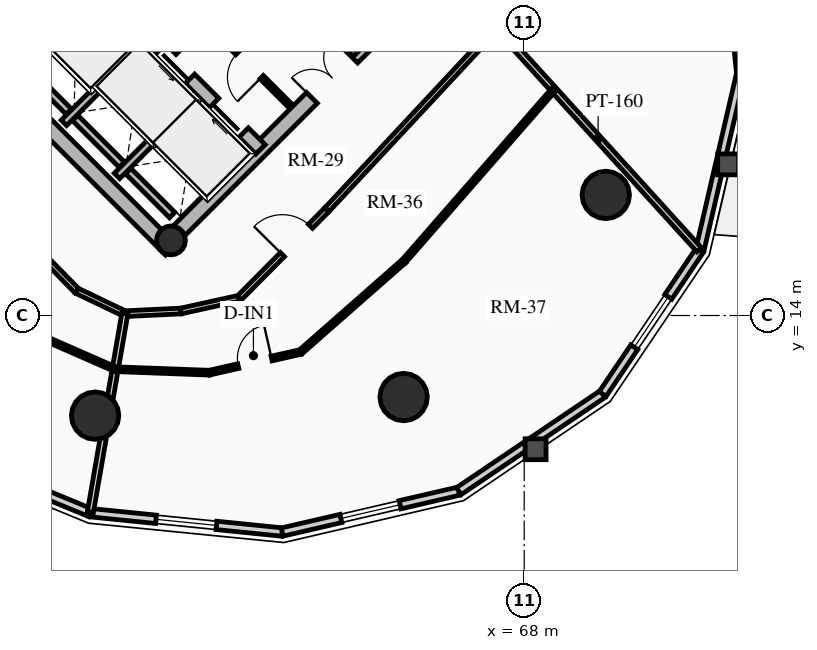
"""IFC4 building model, lengths in metres.
Left out: names, types, materials, properties, quantities, classifications, styles, units other than length and angle.
Written with IfcOpenShell. Run it as: python <this file> out.ifc"""

import sys

from ifc_helpers import new_model, si_unit, direction, frame, frame_2d, origin, origin_2d, place, context, subcontext, project, spatial, rectangle, circle, hollow_circle, extrude, source, transform, mapped, element, fill, save


model = new_model("IFC4")
c1 = context("Model", 3, precision=1e-05, world=origin(), true_north=direction((0.0, 1.0)))
c2 = subcontext(c1, "Body", "Model", "MODEL_VIEW")
j1 = project(units=[si_unit("LENGTHUNIT", "METRE"), si_unit("PLANEANGLEUNIT", "RADIAN")], contexts=[c1])
p1 = place(None, origin())
s1 = spatial("IfcSite", under=j1, at=p1, CompositionType="ELEMENT")
p2 = place(p1, origin())
s2 = spatial("IfcBuilding", under=s1, at=p2, CompositionType="ELEMENT")
p3 = place(p2, frame((0.0, 0.0, 163.24)))
s3 = spatial("IfcBuildingStorey", under=s2, at=p3, CompositionType="ELEMENT", Elevation=163.24)
p4 = place(p3, frame((58.702, 15.732, 0.0), z_axis=(0.0, 0.0, 1.0), x_axis=(-0.707106781187, 0.707106781187, 0.0)))
e1 = element("IfcWall", 1, at=p4, inside=s3, PredefinedType="SHEAR", context=c2, shape_type="SweptSolid", body=[
    extrude(rectangle(XDim=14.1, YDim=0.4, at=frame_2d((7.05, 0.0))), origin(), (0.0, 0.0, 1.0), 2.91),
])
p5 = place(p3, frame((58.561, 15.873, 0.0), z_axis=(0.0, 0.0, 1.0), x_axis=(0.707106781187, 0.707106781187, 0.0)))
e2 = element("IfcWall", 2, at=p5, inside=s3, PredefinedType="SHEAR", context=c2, shape_type="SweptSolid", body=[
    extrude(rectangle(XDim=10.7, YDim=0.4, at=frame_2d((5.35, 0.0))), origin(), (0.0, 0.0, 1.0), 2.91),
])
m1 = source(origin(), c2, "Body", "SweptSolid", [
    extrude(rectangle(XDim=1.5, YDim=2.02, at=frame_2d((0.75, 1.01))), frame((0.0, 0.21, 0.0), z_axis=(0.0, -1.0, 0.0), x_axis=(1.0, 0.0, 0.0)), (0.0, 0.0, 1.0), 0.42),
])
p6 = place(p5, frame((5.45, 0.0, 0.0)))
e3 = element("IfcOpeningElement", 3, at=p6, cuts=e2, PredefinedType="OPENING", context=c2, shape_type="MappedRepresentation", body=[
    mapped(m1, transform((0.0, 0.0, 0.0), x_axis=(1.0, 0.0, 0.0), y_axis=(0.0, 1.0, 0.0), z_axis=(0.0, 0.0, 1.0), scale=1.0)),
])
p7 = place(p3, frame((61.06, 18.373, 0.0), z_axis=(0.0, 0.0, 1.0), x_axis=(-0.707106781187, 0.707106781187, 0.0)))
e4 = element("IfcWall", 4, at=p7, inside=s3, PredefinedType="SHEAR", context=c2, shape_type="SweptSolid", body=[
    extrude(rectangle(XDim=13.7, YDim=0.35, at=frame_2d((6.85, 0.0))), origin(), (0.0, 0.0, 1.0), 2.91),
])
m2 = source(origin(), c2, "Body", "SweptSolid", [
    extrude(rectangle(XDim=1.1, YDim=2.015, at=frame_2d((0.55, 1.007))), frame((0.0, 0.185, 0.0), z_axis=(0.0, -1.0, 0.0), x_axis=(1.0, 0.0, 0.0)), (0.0, 0.0, 1.0), 0.37),
])
p8 = place(p7, frame((4.85, 0.0, 0.0)))
e5 = element("IfcOpeningElement", 5, at=p8, cuts=e4, PredefinedType="OPENING", context=c2, shape_type="MappedRepresentation", body=[
    mapped(m2, transform((0.0, 0.0, 0.0), x_axis=(1.0, 0.0, 0.0), y_axis=(0.0, 1.0, 0.0), z_axis=(0.0, 0.0, 1.0), scale=1.0)),
])
p9 = place(p7, frame((0.625, 0.0, 0.0)))
e6 = element("IfcOpeningElement", 6, at=p9, cuts=e4, PredefinedType="OPENING", context=c2, shape_type="MappedRepresentation", body=[
    mapped(m2, transform((0.0, 0.0, 0.0), x_axis=(1.0, 0.0, 0.0), y_axis=(0.0, 1.0, 0.0), z_axis=(0.0, 0.0, 1.0), scale=1.0)),
])
p10 = place(p7, frame((2.625, 0.0, 0.0)))
e7 = element("IfcOpeningElement", 7, at=p10, cuts=e4, PredefinedType="OPENING", context=c2, shape_type="MappedRepresentation", body=[
    mapped(m2, transform((0.0, 0.0, 0.0), x_axis=(1.0, 0.0, 0.0), y_axis=(0.0, 1.0, 0.0), z_axis=(0.0, 0.0, 1.0), scale=1.0)),
])
m3 = source(origin(), c2, "Body", "SweptSolid", [
    extrude(rectangle(XDim=1.15, YDim=2.02, at=frame_2d((0.575, 1.01))), frame((0.0, 0.185, 0.0), z_axis=(0.0, -1.0, 0.0), x_axis=(1.0, 0.0, 0.0)), (0.0, 0.0, 1.0), 0.37),
])
p11 = place(p7, frame((7.27, 0.0, 0.0)))
e8 = element("IfcOpeningElement", 8, at=p11, cuts=e4, PredefinedType="OPENING", context=c2, shape_type="MappedRepresentation", body=[
    mapped(m3, transform((0.0, 0.0, 0.0), x_axis=(1.0, 0.0, 0.0), y_axis=(0.0, 1.0, 0.0), z_axis=(0.0, 0.0, 1.0), scale=1.0)),
])
p12 = place(p3, frame((63.627, 20.94, 0.0), z_axis=(0.0, 0.0, 1.0), x_axis=(-0.707119496762, 0.707094065383, 0.0)))
e9 = element("IfcWall", 9, at=p12, inside=s3, PredefinedType="SHEAR", context=c2, shape_type="SweptSolid", body=[
    extrude(rectangle(XDim=9.6, YDim=0.35, at=frame_2d((4.8, 0.0))), origin(), (0.0, 0.0, 1.0), 2.91),
])
p13 = place(p12, frame((5.28, 0.0, 0.0)))
e10 = element("IfcOpeningElement", 10, at=p13, cuts=e9, PredefinedType="OPENING", context=c2, shape_type="MappedRepresentation", body=[
    mapped(m3, transform((0.0, 0.0, 0.0), x_axis=(1.0, 0.0, 0.0), y_axis=(0.0, 1.0, 0.0), z_axis=(0.0, 0.0, 1.0), scale=1.0)),
])
p14 = place(p3, frame((53.784, 21.003, 0.0), z_axis=(0.0, 0.0, 1.0), x_axis=(0.707106781187, 0.707106781187, 0.0)))
e11 = element("IfcWall", 11, at=p14, inside=s3, PredefinedType="SHEAR", context=c2, shape_type="SweptSolid", body=[
    extrude(rectangle(XDim=3.285, YDim=0.35, at=frame_2d((1.643, 0.0))), origin(), (0.0, 0.0, 1.0), 2.91),
])
p15 = place(p3, frame((58.706, 15.976, 0.0), z_axis=(0.0, 0.0, 1.0), x_axis=(0.707106781187, 0.707106781187, 0.0)))
e12 = element("IfcColumn", 12, at=p15, inside=s3, PredefinedType="COLUMN", context=c2, shape_type="SweptSolid", body=[
    extrude(hollow_circle(Radius=0.38, WallThickness=0.032, at=origin_2d()), origin(), (0.0, 0.0, 1.0), 2.91),
])
for number, where, z_axis, x_axis in (
    (13, (56.709, 11.365, 0.0), (0.0, 0.0, 1.0), (1.0, 0.0, 0.0)),
    (14, (64.827, 11.854, 0.0), (0.0, 0.0, 1.0), (1.0, 0.0, 0.0)),
    (15, (70.146, 17.173, 0.0), (0.0, 0.0, 1.0), (1.0, 0.0, 0.0)),
):
    element("IfcColumn", number, at=place(p3, frame(where, z_axis=z_axis, x_axis=x_axis)), inside=s3, PredefinedType="USERDEFINED", context=c2, shape_type="SweptSolid", body=[
        extrude(circle(Radius=0.625, at=origin_2d()), origin(), (0.0, 0.0, 1.0), 2.91),
    ])
p16 = place(p3, frame((56.582, 8.811, 0.0), z_axis=(0.0, 0.0, 1.0), x_axis=(-0.924528197738, 0.38111364655, 0.0)))
e16 = element("IfcWall", 16, at=p16, inside=s3, PredefinedType="SOLIDWALL", context=c2, shape_type="SweptSolid", body=[
    extrude(rectangle(XDim=5.366, YDim=0.22, at=frame_2d((2.683, 0.0))), origin(), (0.0, 0.0, 1.0), 2.245),
])
p17 = place(p3, frame((61.633, 8.302, 0.0), z_axis=(0.0, 0.0, 1.0), x_axis=(-0.994959267396, 0.100279889424, 0.0)))
e17 = element("IfcWall", 17, at=p17, inside=s3, PredefinedType="SOLIDWALL", context=c2, shape_type="SweptSolid", body=[
    extrude(rectangle(XDim=5.076, YDim=0.22, at=frame_2d((2.538, 0.0))), origin(), (0.0, 0.0, 1.0), 2.245),
])
m4 = source(origin(), c2, "Body", "SweptSolid", [
    extrude(rectangle(XDim=1.6, YDim=1.3, at=frame_2d((0.8, 0.65))), frame((0.0, 0.12, 0.0), z_axis=(0.0, -1.0, 0.0), x_axis=(1.0, 0.0, 0.0)), (0.0, 0.0, 1.0), 0.24),
])
p18 = place(p17, frame((1.738, 0.0, 0.65)))
e18 = element("IfcOpeningElement", 18, at=p18, cuts=e17, PredefinedType="OPENING", context=c2, shape_type="MappedRepresentation", body=[
    mapped(m4, transform((0.0, 0.0, 0.0), x_axis=(1.0, 0.0, 0.0), y_axis=(0.0, 1.0, 0.0), z_axis=(0.0, 0.0, 1.0), scale=1.0)),
])
p19 = place(p3, frame((66.279, 9.378, 0.0), z_axis=(0.0, 0.0, 1.0), x_axis=(-0.974206226622, -0.225659540039, 0.0)))
e19 = element("IfcWall", 19, at=p19, inside=s3, PredefinedType="SOLIDWALL", context=c2, shape_type="SweptSolid", body=[
    extrude(rectangle(XDim=4.769, YDim=0.22, at=frame_2d((2.385, 0.0))), origin(), (0.0, 0.0, 1.0), 2.245),
])
p20 = place(p19, frame((1.585, 0.0, 0.65)))
e20 = element("IfcOpeningElement", 20, at=p20, cuts=e19, PredefinedType="OPENING", context=c2, shape_type="MappedRepresentation", body=[
    mapped(m4, transform((0.0, 0.0, 0.0), x_axis=(1.0, 0.0, 0.0), y_axis=(0.0, 1.0, 0.0), z_axis=(0.0, 0.0, 1.0), scale=1.0)),
])
p21 = place(p3, frame((70.065, 11.935, 0.0), z_axis=(0.0, 0.0, 1.0), x_axis=(-0.828739009952, -0.559635286042, 0.0)))
e21 = element("IfcWall", 21, at=p21, inside=s3, PredefinedType="SOLIDWALL", context=c2, shape_type="SweptSolid", body=[
    extrude(rectangle(XDim=4.569, YDim=0.22, at=frame_2d((2.284, 0.0))), origin(), (0.0, 0.0, 1.0), 2.245),
])
p22 = place(p3, frame((72.622, 15.721, 0.0), z_axis=(0.0, 0.0, 1.0), x_axis=(-0.559635286042, -0.828739009952, 0.0)))
e22 = element("IfcWall", 22, at=p22, inside=s3, PredefinedType="SOLIDWALL", context=c2, shape_type="SweptSolid", body=[
    extrude(rectangle(XDim=4.569, YDim=0.22, at=frame_2d((2.284, 0.0))), origin(), (0.0, 0.0, 1.0), 2.245),
])
p23 = place(p22, frame((1.484, 0.0, 0.65)))
e23 = element("IfcOpeningElement", 23, at=p23, cuts=e22, PredefinedType="OPENING", context=c2, shape_type="MappedRepresentation", body=[
    mapped(m4, transform((0.0, 0.0, 0.0), x_axis=(1.0, 0.0, 0.0), y_axis=(0.0, 1.0, 0.0), z_axis=(0.0, 0.0, 1.0), scale=1.0)),
])
p24 = place(p3, frame((73.698, 20.367, 0.0), z_axis=(0.0, 0.0, 1.0), x_axis=(-0.225659540039, -0.974206226622, 0.0)))
e24 = element("IfcWall", 24, at=p24, inside=s3, PredefinedType="SOLIDWALL", context=c2, shape_type="SweptSolid", body=[
    extrude(rectangle(XDim=4.769, YDim=0.22, at=frame_2d((2.385, 0.0))), origin(), (0.0, 0.0, 1.0), 2.245),
])
p25 = place(p3, frame((73.189, 25.418, 0.0), z_axis=(0.0, 0.0, 1.0), x_axis=(0.100279889424, -0.994959267396, 0.0)))
e25 = element("IfcWall", 25, at=p25, inside=s3, PredefinedType="SOLIDWALL", context=c2, shape_type="SweptSolid", body=[
    extrude(rectangle(XDim=5.076, YDim=0.22, at=frame_2d((2.538, 0.0))), origin(), (0.0, 0.0, 1.0), 2.245),
])
p26 = place(p25, frame((1.738, 0.0, 0.65)))
e26 = element("IfcOpeningElement", 26, at=p26, cuts=e25, PredefinedType="OPENING", context=c2, shape_type="MappedRepresentation", body=[
    mapped(m4, transform((0.0, 0.0, 0.0), x_axis=(1.0, 0.0, 0.0), y_axis=(0.0, 1.0, 0.0), z_axis=(0.0, 0.0, 1.0), scale=1.0)),
])
p27 = place(p3, frame((55.888, 19.069, 0.0), z_axis=(0.0, 0.0, 1.0), x_axis=(0.707106781187, 0.707106781187, 0.0)))
e27 = element("IfcWall", 27, at=p27, inside=s3, PredefinedType="SHEAR", context=c2, shape_type="SweptSolid", body=[
    extrude(rectangle(XDim=2.97, YDim=0.2, at=frame_2d((1.485, 0.0))), origin(), (0.0, 0.0, 1.0), 2.91),
])
p28 = place(p3, frame((56.015, 19.366, 0.0), z_axis=(0.0, 0.0, 1.0), x_axis=(-0.707106781187, 0.707106781187, 0.0)))
e28 = element("IfcWall", 28, at=p28, inside=s3, PredefinedType="SHEAR", context=c2, shape_type="SweptSolid", body=[
    extrude(rectangle(XDim=2.44, YDim=0.2, at=frame_2d((1.22, 0.0))), origin(), (0.0, 0.0, 1.0), 2.91),
])
p29 = place(p3, frame((57.284, 17.673, 0.0), z_axis=(0.0, 0.0, 1.0), x_axis=(0.707147878904, 0.70706568108, 0.0)))
e29 = element("IfcWall", 29, at=p29, inside=s3, PredefinedType="SHEAR", context=c2, shape_type="SweptSolid", body=[
    extrude(rectangle(XDim=2.97, YDim=0.2, at=frame_2d((1.485, 0.0))), origin(), (0.0, 0.0, 1.0), 2.91),
])
p30 = place(p3, frame((57.412, 17.97, 0.0), z_axis=(0.0, 0.0, 1.0), x_axis=(-0.707106781187, 0.707106781187, 0.0)))
e30 = element("IfcWall", 30, at=p30, inside=s3, PredefinedType="SHEAR", context=c2, shape_type="SweptSolid", body=[
    extrude(rectangle(XDim=1.735, YDim=0.2, at=frame_2d((0.867, 0.0))), origin(), (0.0, 0.0, 1.0), 2.91),
])
p31 = place(p3, frame((58.737, 16.644, 0.0), z_axis=(0.0, 0.0, 1.0), x_axis=(-0.707032117043, 0.707181437447, 0.0)))
e31 = element("IfcWall", 31, at=p31, inside=s3, PredefinedType="SHEAR", context=c2, shape_type="SweptSolid", body=[
    extrude(rectangle(XDim=1.635, YDim=0.2, at=frame_2d((0.817, 0.0))), origin(), (0.0, 0.0, 1.0), 2.91),
])
p32 = place(p3, frame((61.835, 19.529, 0.0), z_axis=(0.0, 0.0, 1.0), x_axis=(-0.707146413884, 0.707067146267, 0.0)))
e32 = element("IfcWall", 32, at=p32, inside=s3, PredefinedType="PARTITIONING", context=c2, shape_type="SweptSolid", body=[
    extrude(rectangle(XDim=3.08, YDim=0.125, at=frame_2d((1.54, 0.0))), origin(), (0.0, 0.0, 1.0), 2.675),
])
m5 = source(origin(), c2, "Body", "SweptSolid", [
    extrude(rectangle(XDim=0.9, YDim=2.005, at=frame_2d((0.45, 1.002))), frame((0.0, 0.073, 0.0), z_axis=(0.0, -1.0, 0.0), x_axis=(1.0, 0.0, 0.0)), (0.0, 0.0, 1.0), 0.145),
])
p33 = place(p32, frame((1.05, 0.0, 0.0)))
e33 = element("IfcOpeningElement", 33, at=p33, cuts=e32, PredefinedType="OPENING", context=c2, shape_type="MappedRepresentation", body=[
    mapped(m5, transform((0.0, 0.0, 0.0), x_axis=(1.0, 0.0, 0.0), y_axis=(0.0, 1.0, 0.0), z_axis=(0.0, 0.0, 1.0), scale=1.0)),
])
p34 = place(p3, frame((58.794, 20.915, 0.0), z_axis=(0.0, 0.0, 1.0), x_axis=(0.707106781187, 0.707106781187, 0.0)))
e34 = element("IfcWall", 34, at=p34, inside=s3, PredefinedType="PARTITIONING", context=c2, shape_type="SweptSolid", body=[
    extrude(rectangle(XDim=1.1, YDim=0.125, at=frame_2d((0.55, 0.0))), origin(), (0.0, 0.0, 1.0), 2.675),
])
p35 = place(p3, frame((51.985, 18.985, 0.0), z_axis=(0.0, 0.0, 1.0), x_axis=(0.699619654291, -0.714515457726, 0.0)))
e35 = element("IfcWall", 35, at=p35, inside=s3, PredefinedType="PARTITIONING", context=c2, shape_type="SweptSolid", body=[
    extrude(rectangle(XDim=6.064, YDim=0.15, at=frame_2d((3.032, 0.0))), origin(), (0.0, 0.0, 1.0), 2.245),
])
m6 = source(origin(), c2, "Body", "SweptSolid", [
    extrude(rectangle(XDim=1.05, YDim=2.015, at=frame_2d((0.525, 1.007))), frame((0.0, 0.085, 0.0), z_axis=(0.0, -1.0, 0.0), x_axis=(1.0, 0.0, 0.0)), (0.0, 0.0, 1.0), 0.17),
])
p36 = place(p35, frame((2.507, 0.0, 0.0)))
e36 = element("IfcOpeningElement", 36, at=p36, cuts=e35, PredefinedType="OPENING", context=c2, shape_type="MappedRepresentation", body=[
    mapped(m6, transform((0.0, 0.0, 0.0), x_axis=(1.0, 0.0, 0.0), y_axis=(0.0, 1.0, 0.0), z_axis=(0.0, 0.0, 1.0), scale=1.0)),
])
p37 = place(p3, frame((56.227, 14.652, 0.0), z_axis=(0.0, 0.0, 1.0), x_axis=(0.902364039563, -0.430974639745, 0.0)))
e37 = element("IfcWall", 37, at=p37, inside=s3, PredefinedType="PARTITIONING", context=c2, shape_type="SweptSolid", body=[
    extrude(rectangle(XDim=1.401, YDim=0.15, at=frame_2d((0.701, 0.0))), origin(), (0.0, 0.0, 1.0), 2.245),
])
p38 = place(p3, frame((57.492, 14.048, 0.0), z_axis=(0.0, 0.0, 1.0), x_axis=(0.99885011351, 0.047942160364, 0.0)))
e38 = element("IfcWall", 38, at=p38, inside=s3, PredefinedType="PARTITIONING", context=c2, shape_type="SweptSolid", body=[
    extrude(rectangle(XDim=1.477, YDim=0.15, at=frame_2d((0.738, 0.0))), origin(), (0.0, 0.0, 1.0), 2.245),
])
p39 = place(p3, frame((58.967, 14.118, 0.0), z_axis=(0.0, 0.0, 1.0), x_axis=(0.976471358036, 0.215647135235, 0.0)))
e39 = element("IfcWall", 39, at=p39, inside=s3, PredefinedType="PARTITIONING", context=c2, shape_type="SweptSolid", body=[
    extrude(rectangle(XDim=1.571, YDim=0.15, at=frame_2d((0.786, 0.0))), origin(), (0.0, 0.0, 1.0), 2.245),
])
p40 = place(p3, frame((60.501, 14.457, 0.0), z_axis=(0.0, 0.0, 1.0), x_axis=(0.704012266258, 0.710187812454, 0.0)))
e40 = element("IfcWall", 40, at=p40, inside=s3, PredefinedType="PARTITIONING", context=c2, shape_type="SweptSolid", body=[
    extrude(rectangle(XDim=3.281, YDim=0.15, at=frame_2d((1.641, 0.0))), origin(), (0.0, 0.0, 1.0), 2.245),
])
p41 = place(p40, frame((1.614, 0.0, 0.0)))
e41 = element("IfcOpeningElement", 41, at=p41, cuts=e40, PredefinedType="OPENING", context=c2, shape_type="MappedRepresentation", body=[
    mapped(m6, transform((0.0, 0.0, 0.0), x_axis=(1.0, 0.0, 0.0), y_axis=(0.0, 1.0, 0.0), z_axis=(0.0, 0.0, 1.0), scale=1.0)),
])
p42 = place(p3, frame((62.812, 16.788, 0.0), z_axis=(0.0, 0.0, 1.0), x_axis=(0.682323555485, 0.731050316757, 0.0)))
e42 = element("IfcWall", 42, at=p42, inside=s3, PredefinedType="PARTITIONING", context=c2, shape_type="SweptSolid", body=[
    extrude(rectangle(XDim=6.559, YDim=0.15, at=frame_2d((3.279, 0.0))), origin(), (0.0, 0.0, 1.0), 2.245),
])
p43 = place(p3, frame((57.492, 14.048, 0.0), z_axis=(0.0, 0.0, 1.0), x_axis=(-0.171191349619, -0.985237799628, 0.0)))
e43 = element("IfcWall", 43, at=p43, inside=s3, PredefinedType="PARTITIONING", context=c2, shape_type="SweptSolid", body=[
    extrude(rectangle(XDim=5.295, YDim=0.16, at=frame_2d((2.647, 0.0))), origin(), (0.0, 0.0, 1.0), 2.245),
])
p44 = place(p3, frame((67.287, 21.582, 0.0), z_axis=(0.0, 0.0, 1.0), x_axis=(0.672520632772, -0.740078373212, 0.0)))
e44 = element("IfcWall", 44, at=p44, inside=s3, PredefinedType="PARTITIONING", context=c2, shape_type="SweptSolid", body=[
    extrude(rectangle(XDim=7.907, YDim=0.16, at=frame_2d((3.954, 0.0))), origin(), (0.0, 0.0, 1.0), 2.245),
])
p45 = place(p3, frame((54.94, 13.594, 0.0), z_axis=(0.0, 0.0, 1.0), x_axis=(0.915898070967, -0.401410916143, 0.0)))
e45 = element("IfcWall", 45, at=p45, inside=s3, PredefinedType="PARTITIONING", context=c2, shape_type="SweptSolid", body=[
    extrude(rectangle(XDim=2.509, YDim=0.125, at=frame_2d((1.254, 0.0))), origin(), (0.0, 0.0, 1.0), 2.245),
])
p46 = place(p3, frame((57.238, 12.587, 0.0), z_axis=(0.0, 0.0, 1.0), x_axis=(0.999316318576, -0.036971548882, 0.0)))
e46 = element("IfcWall", 46, at=p46, inside=s3, PredefinedType="PARTITIONING", context=c2, shape_type="SweptSolid", body=[
    extrude(rectangle(XDim=2.476, YDim=0.125, at=frame_2d((1.238, 0.0))), origin(), (0.0, 0.0, 1.0), 2.245),
])
p47 = place(p3, frame((59.713, 12.495, 0.0), z_axis=(0.0, 0.0, 1.0), x_axis=(0.975260144608, 0.221060286662, 0.0)))
e47 = element("IfcWall", 47, at=p47, inside=s3, PredefinedType="PARTITIONING", context=c2, shape_type="SweptSolid", body=[
    extrude(rectangle(XDim=2.465, YDim=0.125, at=frame_2d((1.232, 0.0))), origin(), (0.0, 0.0, 1.0), 2.245),
])
p48 = place(p47, frame((0.782, 0.0, 0.0)))
e48 = element("IfcOpeningElement", 48, at=p48, cuts=e47, PredefinedType="OPENING", context=c2, shape_type="MappedRepresentation", body=[
    mapped(m5, transform((0.0, 0.0, 0.0), x_axis=(1.0, 0.0, 0.0), y_axis=(0.0, 1.0, 0.0), z_axis=(0.0, 0.0, 1.0), scale=1.0)),
])
p49 = place(p3, frame((62.117, 13.04, 0.0), z_axis=(0.0, 0.0, 1.0), x_axis=(0.751084924077, 0.660205601933, 0.0)))
e49 = element("IfcWall", 49, at=p49, inside=s3, PredefinedType="PARTITIONING", context=c2, shape_type="SweptSolid", body=[
    extrude(rectangle(XDim=3.624, YDim=0.125, at=frame_2d((1.812, 0.0))), origin(), (0.0, 0.0, 1.0), 2.245),
])
p50 = place(p3, frame((64.839, 15.433, 0.0), z_axis=(0.0, 0.0, 1.0), x_axis=(0.657505208165, 0.753449999161, 0.0)))
e50 = element("IfcWall", 50, at=p50, inside=s3, PredefinedType="PARTITIONING", context=c2, shape_type="SweptSolid", body=[
    extrude(rectangle(XDim=5.988, YDim=0.125, at=frame_2d((2.994, 0.0))), origin(), (0.0, 0.0, 1.0), 2.245),
])
m7 = source(origin(), c2, "Body", "SweptSolid", [
    extrude(rectangle(XDim=1.6, YDim=1.3, at=frame_2d((0.8, 0.65))), frame((0.0, 0.03, 0.0), z_axis=(0.0, -1.0, 0.0), x_axis=(1.0, 0.0, 0.0)), (0.0, 0.0, 1.0), 0.06),
])
p51 = place(p18, origin())
e51 = element("IfcWindow", 51, at=p51, inside=s3, PartitioningType="SINGLE_PANEL", PredefinedType="WINDOW", context=c2, shape_type="MappedRepresentation", body=[
    mapped(m7, transform((0.0, 0.0, 0.0), x_axis=(1.0, 0.0, 0.0), y_axis=(0.0, 1.0, 0.0), z_axis=(0.0, 0.0, 1.0), scale=1.0)),
])
fill(e18, e51)
p52 = place(p20, origin())
e52 = element("IfcWindow", 52, at=p52, inside=s3, PartitioningType="SINGLE_PANEL", PredefinedType="WINDOW", context=c2, shape_type="MappedRepresentation", body=[
    mapped(m7, transform((0.0, 0.0, 0.0), x_axis=(1.0, 0.0, 0.0), y_axis=(0.0, 1.0, 0.0), z_axis=(0.0, 0.0, 1.0), scale=1.0)),
])
fill(e20, e52)
p53 = place(p23, origin())
e53 = element("IfcWindow", 53, at=p53, inside=s3, PartitioningType="SINGLE_PANEL", PredefinedType="WINDOW", context=c2, shape_type="MappedRepresentation", body=[
    mapped(m7, transform((0.0, 0.0, 0.0), x_axis=(1.0, 0.0, 0.0), y_axis=(0.0, 1.0, 0.0), z_axis=(0.0, 0.0, 1.0), scale=1.0)),
])
fill(e23, e53)
m8 = source(origin(), c2, "Body", "SweptSolid", [
    extrude(rectangle(XDim=1.1, YDim=2.015, at=frame_2d((0.55, 1.007))), frame((0.0, 0.025, 0.0), z_axis=(0.0, -1.0, 0.0), x_axis=(1.0, 0.0, 0.0)), (0.0, 0.0, 1.0), 0.05),
])
p54 = place(p9, origin())
e54 = element("IfcDoor", 54, at=p54, inside=s3, OperationType="SLIDING_TO_RIGHT", PredefinedType="DOOR", context=c2, shape_type="MappedRepresentation", body=[
    mapped(m8, transform((0.0, 0.0, 0.0), x_axis=(1.0, 0.0, 0.0), y_axis=(0.0, 1.0, 0.0), z_axis=(0.0, 0.0, 1.0), scale=1.0)),
])
fill(e6, e54)
p55 = place(p10, origin())
e55 = element("IfcDoor", 55, at=p55, inside=s3, OperationType="SLIDING_TO_LEFT", PredefinedType="DOOR", context=c2, shape_type="MappedRepresentation", body=[
    mapped(m8, transform((0.0, 0.0, 0.0), x_axis=(1.0, 0.0, 0.0), y_axis=(0.0, 1.0, 0.0), z_axis=(0.0, 0.0, 1.0), scale=1.0)),
])
fill(e7, e55)
m9 = source(origin(), c2, "Body", "SweptSolid", [
    extrude(rectangle(XDim=1.5, YDim=2.02, at=frame_2d((0.75, 1.01))), frame((0.0, 0.025, 0.0), z_axis=(0.0, -1.0, 0.0), x_axis=(1.0, 0.0, 0.0)), (0.0, 0.0, 1.0), 0.05),
])
p56 = place(p6, origin())
e56 = element("IfcDoor", 56, at=p56, inside=s3, OperationType="DOUBLE_DOOR_SINGLE_SWING", PredefinedType="DOOR", context=c2, shape_type="MappedRepresentation", body=[
    mapped(m9, transform((0.0, 0.0, 0.0), x_axis=(1.0, 0.0, 0.0), y_axis=(0.0, 1.0, 0.0), z_axis=(0.0, 0.0, 1.0), scale=1.0)),
])
fill(e3, e56)
m10 = source(origin(), c2, "Body", "SweptSolid", [
    extrude(rectangle(XDim=0.9, YDim=2.005, at=frame_2d((0.45, 1.002))), frame((0.0, 0.025, 0.0), z_axis=(0.0, -1.0, 0.0), x_axis=(1.0, 0.0, 0.0)), (0.0, 0.0, 1.0), 0.05),
])
p57 = place(p33, origin())
e57 = element("IfcDoor", 57, at=p57, inside=s3, OperationType="SINGLE_SWING_LEFT", PredefinedType="DOOR", context=c2, shape_type="MappedRepresentation", body=[
    mapped(m10, transform((0.0, 0.0, 0.0), x_axis=(1.0, 0.0, 0.0), y_axis=(0.0, 1.0, 0.0), z_axis=(0.0, 0.0, 1.0), scale=1.0)),
])
fill(e33, e57)
m11 = source(origin(), c2, "Body", "SweptSolid", [
    extrude(rectangle(XDim=1.05, YDim=2.015, at=frame_2d((0.525, 1.007))), frame((0.0, 0.025, 0.0), z_axis=(0.0, -1.0, 0.0), x_axis=(1.0, 0.0, 0.0)), (0.0, 0.0, 1.0), 0.05),
])
p58 = place(p41, origin())
e58 = element("IfcDoor", 58, at=p58, inside=s3, OperationType="SINGLE_SWING_LEFT", PredefinedType="DOOR", context=c2, shape_type="MappedRepresentation", body=[
    mapped(m11, transform((0.0, 0.0, 0.0), x_axis=(1.0, 0.0, 0.0), y_axis=(0.0, 1.0, 0.0), z_axis=(0.0, 0.0, 1.0), scale=1.0)),
])
fill(e41, e58)
p59 = place(p48, origin())
e59 = element("IfcDoor", 59, at=p59, inside=s3, OperationType="SINGLE_SWING_RIGHT", PredefinedType="DOOR", context=c2, shape_type="MappedRepresentation", body=[
    mapped(m10, transform((0.0, 0.0, 0.0), x_axis=(1.0, 0.0, 0.0), y_axis=(0.0, 1.0, 0.0), z_axis=(0.0, 0.0, 1.0), scale=1.0)),
])
fill(e48, e59)
save(model, sys.argv[1])
